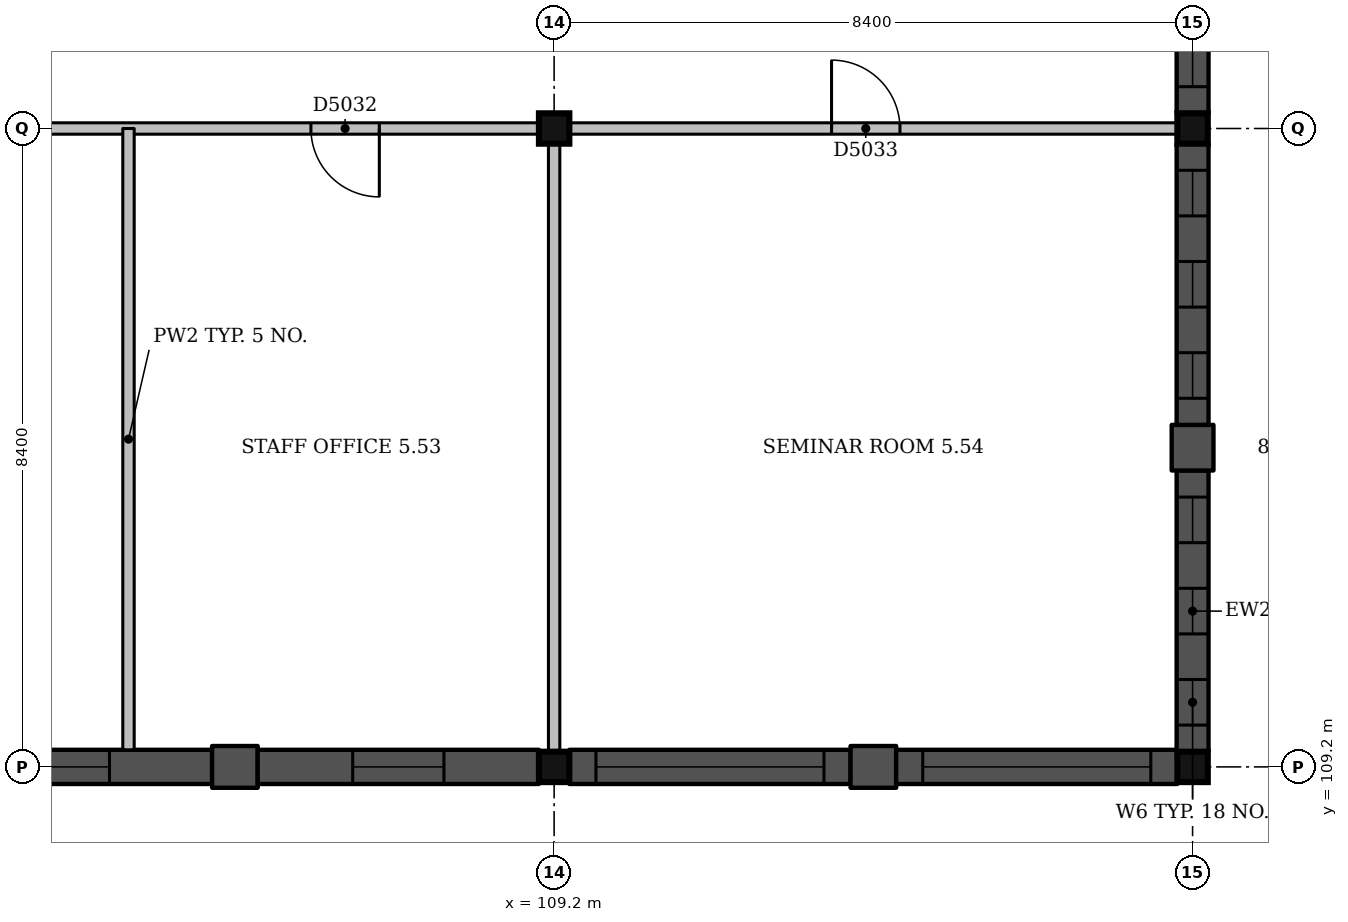
"""IFC4 building model, lengths in metres.
Left out: names, types, materials, properties, quantities, classifications, styles, units other than length and angle.
Written with IfcOpenShell. Run it as: python <this file> out.ifc"""

import sys

from ifc_helpers import new_model, si_unit, direction, frame, frame_2d, origin, origin_2d, place, context, subcontext, project, spatial, rectangle, extrude, element, fill, save


model = new_model("IFC4")
c1 = context("Model", 3, precision=1e-05, world=origin(), true_north=direction((0.0, 1.0)))
c2 = subcontext(c1, "Body", "Model", "MODEL_VIEW")
j1 = project(units=[si_unit("LENGTHUNIT", "METRE"), si_unit("PLANEANGLEUNIT", "RADIAN")], contexts=[c1])
p1 = place(None, origin())
s1 = spatial("IfcSite", under=j1, at=p1, CompositionType="ELEMENT")
p2 = place(p1, origin())
s2 = spatial("IfcBuilding", under=s1, at=p2, CompositionType="ELEMENT")
p3 = place(p2, frame((0.0, 0.0, 22.5)))
s3 = spatial("IfcBuildingStorey", under=s2, at=p3, CompositionType="ELEMENT", Elevation=22.5)
for number, where, z_axis, x_axis in (
    (1, (109.2, 109.2, 0.0), (0.0, 0.0, 1.0), (1.0, 0.0, 0.0)),
    (2, (109.2, 117.6, 0.0), (0.0, 0.0, 1.0), (1.0, 0.0, 0.0)),
    (3, (117.6, 109.2, 0.0), (0.0, 0.0, 1.0), (1.0, 0.0, 0.0)),
    (4, (117.6, 117.6, 0.0), (0.0, 0.0, 1.0), (1.0, 0.0, 0.0)),
):
    element("IfcColumn", number, at=place(p3, frame(where, z_axis=z_axis, x_axis=x_axis)), inside=s3, PredefinedType="COLUMN", context=c2, shape_type="SweptSolid", body=[
        extrude(rectangle(XDim=0.4, YDim=0.4, at=origin_2d()), origin(), (0.0, 0.0, 1.0), 4.5),
    ])
p4 = place(p3, frame((101.0, 109.2, 0.0), z_axis=(0.0, 0.0, 1.0), x_axis=(1.0, 0.0, 0.0)))
e5 = element("IfcWall", 5, at=p4, inside=s3, PredefinedType="SOLIDWALL", context=c2, shape_type="SweptSolid", body=[
    extrude(rectangle(XDim=3.7, YDim=0.45, at=frame_2d((1.85, 0.0))), origin(), (0.0, 0.0, 1.0), 3.6),
])
p5 = place(p4, frame((1.15, 0.0, 0.9)))
e6 = element("IfcOpeningElement", 6, at=p5, cuts=e5, PredefinedType="OPENING", context=c2, shape_type="SweptSolid", body=[
    extrude(rectangle(XDim=1.2, YDim=2.1, at=frame_2d((0.6, 1.05))), frame((0.0, 0.235, 0.0), z_axis=(0.0, -1.0, 0.0), x_axis=(1.0, 0.0, 0.0)), (0.0, 0.0, 1.0), 0.47),
])
p6 = place(p3, frame((104.7, 109.2, 0.0), z_axis=(0.0, 0.0, 1.0), x_axis=(1.0, 0.0, 0.0)))
e7 = element("IfcWall", 7, at=p6, inside=s3, PredefinedType="SOLIDWALL", context=c2, shape_type="SweptSolid", body=[
    extrude(rectangle(XDim=0.6, YDim=0.55, at=frame_2d((0.3, 0.0))), origin(), (0.0, 0.0, 1.0), 3.6),
])
p7 = place(p3, frame((105.3, 109.2, 0.0), z_axis=(0.0, 0.0, 1.0), x_axis=(1.0, 0.0, 0.0)))
e8 = element("IfcWall", 8, at=p7, inside=s3, PredefinedType="SOLIDWALL", context=c2, shape_type="SweptSolid", body=[
    extrude(rectangle(XDim=3.7, YDim=0.45, at=frame_2d((1.85, 0.0))), origin(), (0.0, 0.0, 1.0), 3.6),
])
p8 = place(p7, frame((1.25, 0.0, 0.9)))
e9 = element("IfcOpeningElement", 9, at=p8, cuts=e8, PredefinedType="OPENING", context=c2, shape_type="SweptSolid", body=[
    extrude(rectangle(XDim=1.2, YDim=2.1, at=frame_2d((0.6, 1.05))), frame((0.0, 0.235, 0.0), z_axis=(0.0, -1.0, 0.0), x_axis=(1.0, 0.0, 0.0)), (0.0, 0.0, 1.0), 0.47),
])
p9 = place(p3, frame((109.4, 109.2, 0.0), z_axis=(0.0, 0.0, 1.0), x_axis=(1.0, 0.0, 0.0)))
e10 = element("IfcWall", 10, at=p9, inside=s3, PredefinedType="SOLIDWALL", context=c2, shape_type="SweptSolid", body=[
    extrude(rectangle(XDim=3.7, YDim=0.45, at=frame_2d((1.85, 0.0))), origin(), (0.0, 0.0, 1.0), 3.6),
])
p10 = place(p9, frame((0.35, 0.0, 0.9)))
e11 = element("IfcOpeningElement", 11, at=p10, cuts=e10, PredefinedType="OPENING", context=c2, shape_type="SweptSolid", body=[
    extrude(rectangle(XDim=3.0, YDim=2.1, at=frame_2d((1.5, 1.05))), frame((0.0, 0.235, 0.0), z_axis=(0.0, -1.0, 0.0), x_axis=(1.0, 0.0, 0.0)), (0.0, 0.0, 1.0), 0.47),
])
p11 = place(p3, frame((113.1, 109.2, 0.0), z_axis=(0.0, 0.0, 1.0), x_axis=(1.0, 0.0, 0.0)))
e12 = element("IfcWall", 12, at=p11, inside=s3, PredefinedType="SOLIDWALL", context=c2, shape_type="SweptSolid", body=[
    extrude(rectangle(XDim=0.6, YDim=0.55, at=frame_2d((0.3, 0.0))), origin(), (0.0, 0.0, 1.0), 3.6),
])
p12 = place(p3, frame((113.7, 109.2, 0.0), z_axis=(0.0, 0.0, 1.0), x_axis=(1.0, 0.0, 0.0)))
e13 = element("IfcWall", 13, at=p12, inside=s3, PredefinedType="SOLIDWALL", context=c2, shape_type="SweptSolid", body=[
    extrude(rectangle(XDim=3.7, YDim=0.45, at=frame_2d((1.85, 0.0))), origin(), (0.0, 0.0, 1.0), 3.6),
])
p13 = place(p12, frame((0.35, 0.0, 0.9)))
e14 = element("IfcOpeningElement", 14, at=p13, cuts=e13, PredefinedType="OPENING", context=c2, shape_type="SweptSolid", body=[
    extrude(rectangle(XDim=3.0, YDim=2.1, at=frame_2d((1.5, 1.05))), frame((0.0, 0.235, 0.0), z_axis=(0.0, -1.0, 0.0), x_axis=(1.0, 0.0, 0.0)), (0.0, 0.0, 1.0), 0.47),
])
p14 = place(p3, frame((117.6, 109.4, 0.0), z_axis=(0.0, 0.0, 1.0), x_axis=(0.0, 1.0, 0.0)))
e15 = element("IfcWall", 15, at=p14, inside=s3, PredefinedType="SOLIDWALL", context=c2, shape_type="SweptSolid", body=[
    extrude(rectangle(XDim=3.7, YDim=0.42, at=frame_2d((1.85, 0.0))), origin(), (0.0, 0.0, 1.0), 4.2),
])
p15 = place(p14, frame((0.35, 0.0, 1.0)))
e16 = element("IfcOpeningElement", 16, at=p15, cuts=e15, PredefinedType="OPENING", context=c2, shape_type="SweptSolid", body=[
    extrude(rectangle(XDim=0.6, YDim=2.1, at=frame_2d((0.3, 1.05))), frame((0.0, 0.22, 0.0), z_axis=(0.0, -1.0, 0.0), x_axis=(1.0, 0.0, 0.0)), (0.0, 0.0, 1.0), 0.44),
])
p16 = place(p14, frame((1.55, 0.0, 1.0)))
e17 = element("IfcOpeningElement", 17, at=p16, cuts=e15, PredefinedType="OPENING", context=c2, shape_type="SweptSolid", body=[
    extrude(rectangle(XDim=0.6, YDim=2.1, at=frame_2d((0.3, 1.05))), frame((0.0, 0.22, 0.0), z_axis=(0.0, -1.0, 0.0), x_axis=(1.0, 0.0, 0.0)), (0.0, 0.0, 1.0), 0.44),
])
p17 = place(p14, frame((2.75, 0.0, 1.0)))
e18 = element("IfcOpeningElement", 18, at=p17, cuts=e15, PredefinedType="OPENING", context=c2, shape_type="SweptSolid", body=[
    extrude(rectangle(XDim=0.6, YDim=2.1, at=frame_2d((0.3, 1.05))), frame((0.0, 0.22, 0.0), z_axis=(0.0, -1.0, 0.0), x_axis=(1.0, 0.0, 0.0)), (0.0, 0.0, 1.0), 0.44),
])
p18 = place(p3, frame((117.6, 113.1, 0.0), z_axis=(0.0, 0.0, 1.0), x_axis=(0.0, 1.0, 0.0)))
e19 = element("IfcWall", 19, at=p18, inside=s3, PredefinedType="SOLIDWALL", context=c2, shape_type="SweptSolid", body=[
    extrude(rectangle(XDim=0.6, YDim=0.55, at=frame_2d((0.3, 0.0))), origin(), (0.0, 0.0, 1.0), 4.2),
])
p19 = place(p3, frame((117.6, 113.7, 0.0), z_axis=(0.0, 0.0, 1.0), x_axis=(0.0, 1.0, 0.0)))
e20 = element("IfcWall", 20, at=p19, inside=s3, PredefinedType="SOLIDWALL", context=c2, shape_type="SweptSolid", body=[
    extrude(rectangle(XDim=3.7, YDim=0.42, at=frame_2d((1.85, 0.0))), origin(), (0.0, 0.0, 1.0), 4.2),
])
p20 = place(p19, frame((0.35, 0.0, 1.0)))
e21 = element("IfcOpeningElement", 21, at=p20, cuts=e20, PredefinedType="OPENING", context=c2, shape_type="SweptSolid", body=[
    extrude(rectangle(XDim=0.6, YDim=2.1, at=frame_2d((0.3, 1.05))), frame((0.0, 0.22, 0.0), z_axis=(0.0, -1.0, 0.0), x_axis=(1.0, 0.0, 0.0)), (0.0, 0.0, 1.0), 0.44),
])
p21 = place(p19, frame((1.55, 0.0, 1.0)))
e22 = element("IfcOpeningElement", 22, at=p21, cuts=e20, PredefinedType="OPENING", context=c2, shape_type="SweptSolid", body=[
    extrude(rectangle(XDim=0.6, YDim=2.1, at=frame_2d((0.3, 1.05))), frame((0.0, 0.22, 0.0), z_axis=(0.0, -1.0, 0.0), x_axis=(1.0, 0.0, 0.0)), (0.0, 0.0, 1.0), 0.44),
])
p22 = place(p19, frame((2.75, 0.0, 1.0)))
e23 = element("IfcOpeningElement", 23, at=p22, cuts=e20, PredefinedType="OPENING", context=c2, shape_type="SweptSolid", body=[
    extrude(rectangle(XDim=0.6, YDim=2.1, at=frame_2d((0.3, 1.05))), frame((0.0, 0.22, 0.0), z_axis=(0.0, -1.0, 0.0), x_axis=(1.0, 0.0, 0.0)), (0.0, 0.0, 1.0), 0.44),
])
p23 = place(p3, frame((117.6, 117.8, 0.0), z_axis=(0.0, 0.0, 1.0), x_axis=(0.0, 1.0, 0.0)))
e24 = element("IfcWall", 24, at=p23, inside=s3, PredefinedType="SOLIDWALL", context=c2, shape_type="SweptSolid", body=[
    extrude(rectangle(XDim=3.7, YDim=0.42, at=frame_2d((1.85, 0.0))), origin(), (0.0, 0.0, 1.0), 3.6),
])
p24 = place(p23, frame((0.35, 0.0, 1.0)))
e25 = element("IfcOpeningElement", 25, at=p24, cuts=e24, PredefinedType="OPENING", context=c2, shape_type="SweptSolid", body=[
    extrude(rectangle(XDim=0.6, YDim=2.1, at=frame_2d((0.3, 1.05))), frame((0.0, 0.22, 0.0), z_axis=(0.0, -1.0, 0.0), x_axis=(1.0, 0.0, 0.0)), (0.0, 0.0, 1.0), 0.44),
])
p25 = place(p23, frame((1.55, 0.0, 1.0)))
e26 = element("IfcOpeningElement", 26, at=p25, cuts=e24, PredefinedType="OPENING", context=c2, shape_type="SweptSolid", body=[
    extrude(rectangle(XDim=0.6, YDim=2.1, at=frame_2d((0.3, 1.05))), frame((0.0, 0.22, 0.0), z_axis=(0.0, -1.0, 0.0), x_axis=(1.0, 0.0, 0.0)), (0.0, 0.0, 1.0), 0.44),
])
p26 = place(p23, frame((2.75, 0.0, 1.0)))
e27 = element("IfcOpeningElement", 27, at=p26, cuts=e24, PredefinedType="OPENING", context=c2, shape_type="SweptSolid", body=[
    extrude(rectangle(XDim=0.6, YDim=2.1, at=frame_2d((0.3, 1.05))), frame((0.0, 0.22, 0.0), z_axis=(0.0, -1.0, 0.0), x_axis=(1.0, 0.0, 0.0)), (0.0, 0.0, 1.0), 0.44),
])
p27 = place(p3, frame((101.0, 117.6, 0.0), z_axis=(0.0, 0.0, 1.0), x_axis=(1.0, 0.0, 0.0)))
e28 = element("IfcWall", 28, at=p27, inside=s3, PredefinedType="PARTITIONING", context=c2, shape_type="SweptSolid", body=[
    extrude(rectangle(XDim=8.0, YDim=0.15, at=frame_2d((4.0, 0.0))), origin(), (0.0, 0.0, 1.0), 3.6),
])
p28 = place(p27, frame((5.0, 0.0, 0.0)))
e29 = element("IfcOpeningElement", 29, at=p28, cuts=e28, PredefinedType="OPENING", context=c2, shape_type="SweptSolid", body=[
    extrude(rectangle(XDim=0.9, YDim=2.1, at=frame_2d((0.45, 1.05))), frame((0.0, 0.085, 0.0), z_axis=(0.0, -1.0, 0.0), x_axis=(1.0, 0.0, 0.0)), (0.0, 0.0, 1.0), 0.17),
])
p29 = place(p3, frame((109.4, 117.6, 0.0), z_axis=(0.0, 0.0, 1.0), x_axis=(1.0, 0.0, 0.0)))
e30 = element("IfcWall", 30, at=p29, inside=s3, PredefinedType="PARTITIONING", context=c2, shape_type="SweptSolid", body=[
    extrude(rectangle(XDim=8.0, YDim=0.15, at=frame_2d((4.0, 0.0))), origin(), (0.0, 0.0, 1.0), 3.6),
])
p30 = place(p29, frame((3.45, 0.0, 0.0)))
e31 = element("IfcOpeningElement", 31, at=p30, cuts=e30, PredefinedType="OPENING", context=c2, shape_type="SweptSolid", body=[
    extrude(rectangle(XDim=0.9, YDim=2.1, at=frame_2d((0.45, 1.05))), frame((0.0, 0.085, 0.0), z_axis=(0.0, -1.0, 0.0), x_axis=(1.0, 0.0, 0.0)), (0.0, 0.0, 1.0), 0.17),
])
p31 = place(p3, frame((103.6, 109.425, 0.0), z_axis=(0.0, 0.0, 1.0), x_axis=(0.0, 1.0, 0.0)))
e32 = element("IfcWall", 32, at=p31, inside=s3, PredefinedType="PARTITIONING", context=c2, shape_type="SweptSolid", body=[
    extrude(rectangle(XDim=8.175, YDim=0.15, at=frame_2d((4.087, 0.0))), origin(), (0.0, 0.0, 1.0), 3.6),
])
p32 = place(p3, frame((109.2, 109.4, 0.0), z_axis=(0.0, 0.0, 1.0), x_axis=(0.0, 1.0, 0.0)))
e33 = element("IfcWall", 33, at=p32, inside=s3, PredefinedType="PARTITIONING", context=c2, shape_type="SweptSolid", body=[
    extrude(rectangle(XDim=8.0, YDim=0.15, at=frame_2d((4.0, 0.0))), origin(), (0.0, 0.0, 1.0), 4.15),
])
p33 = place(p5, origin())
e34 = element("IfcWindow", 34, at=p33, inside=s3, PartitioningType="SINGLE_PANEL", PredefinedType="WINDOW", context=c2, shape_type="SweptSolid", body=[
    extrude(rectangle(XDim=1.2, YDim=2.1, at=frame_2d((0.6, 1.05))), frame((0.0, 0.135, 0.0), z_axis=(0.0, -1.0, 0.0), x_axis=(1.0, 0.0, 0.0)), (0.0, 0.0, 1.0), 0.06),
])
fill(e6, e34)
p34 = place(p8, origin())
e35 = element("IfcWindow", 35, at=p34, inside=s3, PartitioningType="SINGLE_PANEL", PredefinedType="WINDOW", context=c2, shape_type="SweptSolid", body=[
    extrude(rectangle(XDim=1.2, YDim=2.1, at=frame_2d((0.6, 1.05))), frame((0.0, 0.135, 0.0), z_axis=(0.0, -1.0, 0.0), x_axis=(1.0, 0.0, 0.0)), (0.0, 0.0, 1.0), 0.06),
])
fill(e9, e35)
p35 = place(p10, origin())
e36 = element("IfcWindow", 36, at=p35, inside=s3, PartitioningType="SINGLE_PANEL", PredefinedType="WINDOW", context=c2, shape_type="SweptSolid", body=[
    extrude(rectangle(XDim=3.0, YDim=2.1, at=frame_2d((1.5, 1.05))), frame((0.0, 0.135, 0.0), z_axis=(0.0, -1.0, 0.0), x_axis=(1.0, 0.0, 0.0)), (0.0, 0.0, 1.0), 0.06),
])
fill(e11, e36)
p36 = place(p13, origin())
e37 = element("IfcWindow", 37, at=p36, inside=s3, PartitioningType="SINGLE_PANEL", PredefinedType="WINDOW", context=c2, shape_type="SweptSolid", body=[
    extrude(rectangle(XDim=3.0, YDim=2.1, at=frame_2d((1.5, 1.05))), frame((0.0, 0.135, 0.0), z_axis=(0.0, -1.0, 0.0), x_axis=(1.0, 0.0, 0.0)), (0.0, 0.0, 1.0), 0.06),
])
fill(e14, e37)
p37 = place(p15, origin())
e38 = element("IfcWindow", 38, at=p37, inside=s3, PartitioningType="SINGLE_PANEL", PredefinedType="WINDOW", context=c2, shape_type="SweptSolid", body=[
    extrude(rectangle(XDim=0.6, YDim=2.1, at=frame_2d((0.3, 1.05))), frame((0.0, 0.15, 0.0), z_axis=(0.0, -1.0, 0.0), x_axis=(1.0, 0.0, 0.0)), (0.0, 0.0, 1.0), 0.06),
])
fill(e16, e38)
p38 = place(p16, origin())
e39 = element("IfcWindow", 39, at=p38, inside=s3, PartitioningType="SINGLE_PANEL", PredefinedType="WINDOW", context=c2, shape_type="SweptSolid", body=[
    extrude(rectangle(XDim=0.6, YDim=2.1, at=frame_2d((0.3, 1.05))), frame((0.0, 0.15, 0.0), z_axis=(0.0, -1.0, 0.0), x_axis=(1.0, 0.0, 0.0)), (0.0, 0.0, 1.0), 0.06),
])
fill(e17, e39)
p39 = place(p17, origin())
e40 = element("IfcWindow", 40, at=p39, inside=s3, PartitioningType="SINGLE_PANEL", PredefinedType="WINDOW", context=c2, shape_type="SweptSolid", body=[
    extrude(rectangle(XDim=0.6, YDim=2.1, at=frame_2d((0.3, 1.05))), frame((0.0, 0.15, 0.0), z_axis=(0.0, -1.0, 0.0), x_axis=(1.0, 0.0, 0.0)), (0.0, 0.0, 1.0), 0.06),
])
fill(e18, e40)
p40 = place(p20, origin())
e41 = element("IfcWindow", 41, at=p40, inside=s3, PartitioningType="SINGLE_PANEL", PredefinedType="WINDOW", context=c2, shape_type="SweptSolid", body=[
    extrude(rectangle(XDim=0.6, YDim=2.1, at=frame_2d((0.3, 1.05))), frame((0.0, 0.15, 0.0), z_axis=(0.0, -1.0, 0.0), x_axis=(1.0, 0.0, 0.0)), (0.0, 0.0, 1.0), 0.06),
])
fill(e21, e41)
p41 = place(p21, origin())
e42 = element("IfcWindow", 42, at=p41, inside=s3, PartitioningType="SINGLE_PANEL", PredefinedType="WINDOW", context=c2, shape_type="SweptSolid", body=[
    extrude(rectangle(XDim=0.6, YDim=2.1, at=frame_2d((0.3, 1.05))), frame((0.0, 0.15, 0.0), z_axis=(0.0, -1.0, 0.0), x_axis=(1.0, 0.0, 0.0)), (0.0, 0.0, 1.0), 0.06),
])
fill(e22, e42)
p42 = place(p22, origin())
e43 = element("IfcWindow", 43, at=p42, inside=s3, PartitioningType="SINGLE_PANEL", PredefinedType="WINDOW", context=c2, shape_type="SweptSolid", body=[
    extrude(rectangle(XDim=0.6, YDim=2.1, at=frame_2d((0.3, 1.05))), frame((0.0, 0.15, 0.0), z_axis=(0.0, -1.0, 0.0), x_axis=(1.0, 0.0, 0.0)), (0.0, 0.0, 1.0), 0.06),
])
fill(e23, e43)
p43 = place(p24, origin())
e44 = element("IfcWindow", 44, at=p43, inside=s3, PartitioningType="SINGLE_PANEL", PredefinedType="WINDOW", context=c2, shape_type="SweptSolid", body=[
    extrude(rectangle(XDim=0.6, YDim=2.1, at=frame_2d((0.3, 1.05))), frame((0.0, 0.15, 0.0), z_axis=(0.0, -1.0, 0.0), x_axis=(1.0, 0.0, 0.0)), (0.0, 0.0, 1.0), 0.06),
])
fill(e25, e44)
p44 = place(p28, origin())
e45 = element("IfcDoor", 45, at=p44, inside=s3, OperationType="SINGLE_SWING_RIGHT", PredefinedType="DOOR", context=c2, shape_type="SweptSolid", body=[
    extrude(rectangle(XDim=0.9, YDim=2.1, at=frame_2d((0.45, 1.05))), frame((0.0, 0.025, 0.0), z_axis=(0.0, -1.0, 0.0), x_axis=(1.0, 0.0, 0.0)), (0.0, 0.0, 1.0), 0.05),
])
fill(e29, e45)
p45 = place(p30, origin())
e46 = element("IfcDoor", 46, at=p45, inside=s3, OperationType="SINGLE_SWING_LEFT", PredefinedType="DOOR", context=c2, shape_type="SweptSolid", body=[
    extrude(rectangle(XDim=0.9, YDim=2.1, at=frame_2d((0.45, 1.05))), frame((0.0, 0.025, 0.0), z_axis=(0.0, -1.0, 0.0), x_axis=(1.0, 0.0, 0.0)), (0.0, 0.0, 1.0), 0.05),
])
fill(e31, e46)
save(model, sys.argv[1])
